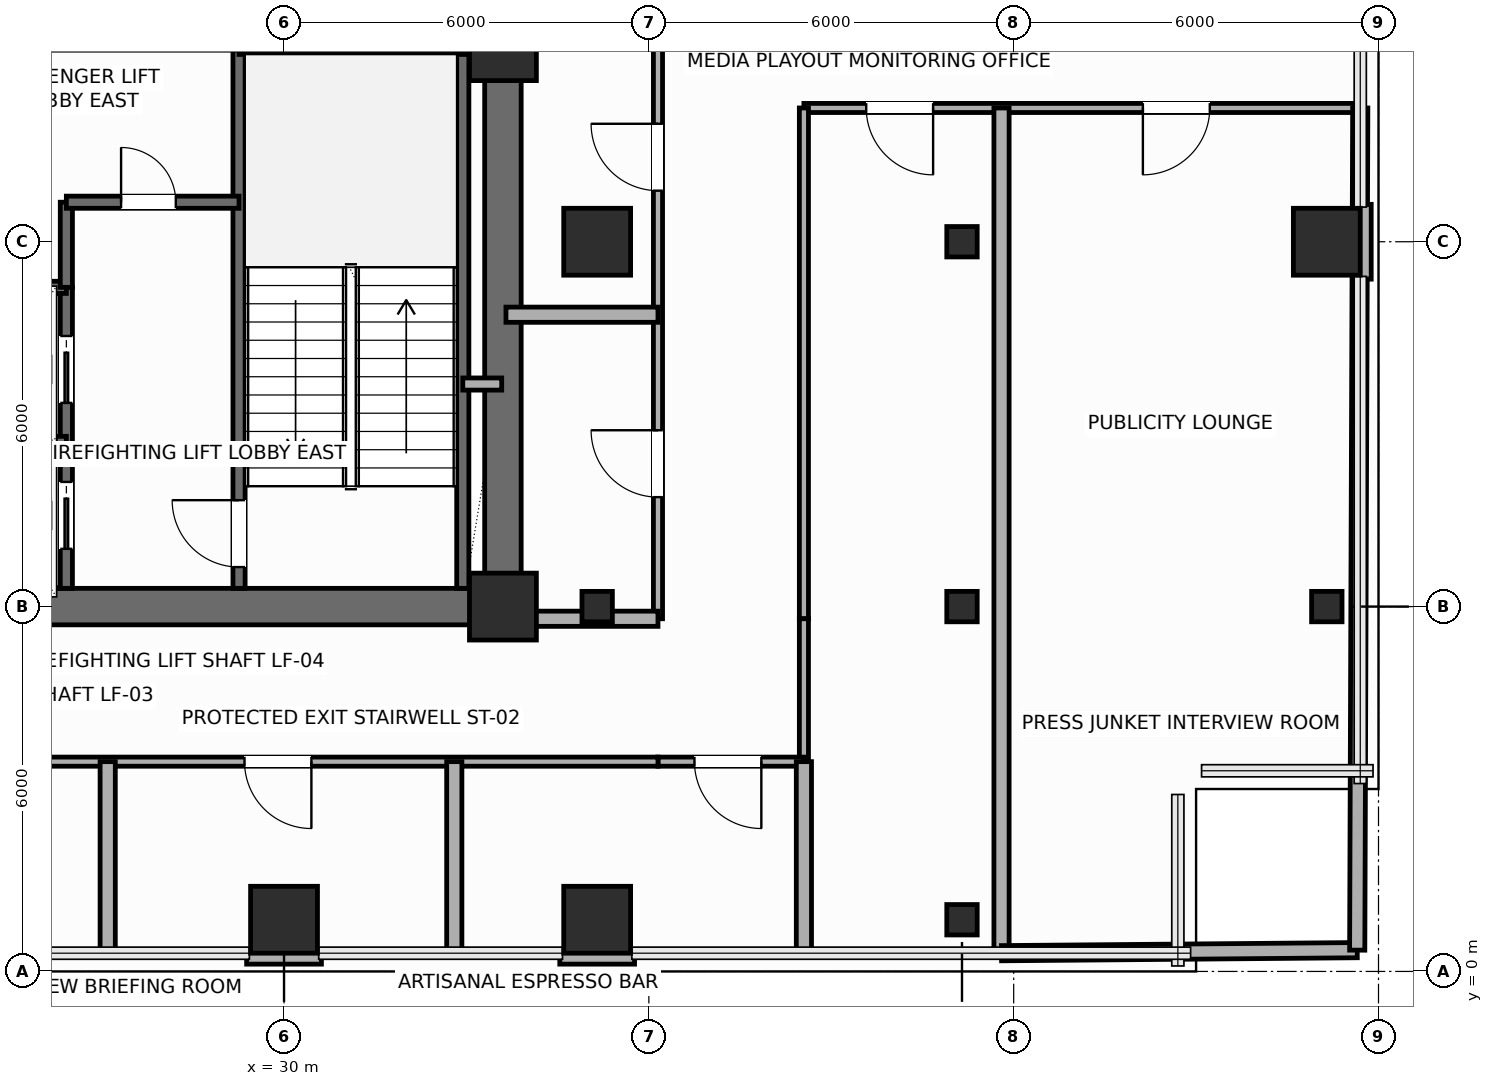
"""IFC4 building model, lengths in metres.
Left out: names, types, materials, properties, quantities, classifications, styles, units other than length and angle.
Written with IfcOpenShell. Run it as: python <this file> out.ifc"""

import sys

from ifc_helpers import new_model, si_unit, direction, frame, frame_2d, origin, origin_2d, place, context, subcontext, project, spatial, rectangle, hollow_rectangle, extrude, element, fill, save


model = new_model("IFC4")
c1 = context("Model", 3, precision=1e-05, world=origin(), true_north=direction((0.0, 1.0)))
c2 = subcontext(c1, "Body", "Model", "MODEL_VIEW")
j1 = project(units=[si_unit("LENGTHUNIT", "METRE"), si_unit("PLANEANGLEUNIT", "RADIAN")], contexts=[c1])
p1 = place(None, origin())
s1 = spatial("IfcSite", under=j1, at=p1, CompositionType="ELEMENT")
p2 = place(p1, origin())
s2 = spatial("IfcBuilding", under=s1, at=p2, CompositionType="ELEMENT")
p3 = place(p2, frame((0.0, 0.0, 126.9)))
s3 = spatial("IfcBuildingStorey", under=s2, at=p3, CompositionType="ELEMENT", Elevation=126.9)
for number, where, z_axis, x_axis in (
    (1, (33.6, 6.0, 0.0), (0.0, 0.0, 1.0), (1.0, 0.0, 0.0)),
    (2, (33.6, 15.2, 0.0), (0.0, 0.0, 1.0), (1.0, 0.0, 0.0)),
    (3, (30.0, 0.85, 0.0), (0.0, 0.0, 1.0), (1.0, 0.0, 0.0)),
    (4, (35.15, 0.85, 0.0), (0.0, 0.0, 1.0), (1.0, 0.0, 0.0)),
):
    element("IfcColumn", number, at=place(p3, frame(where, z_axis=z_axis, x_axis=x_axis)), inside=s3, PredefinedType="COLUMN", context=c2, shape_type="SweptSolid", body=[
        extrude(rectangle(XDim=1.1, YDim=1.1, at=origin_2d()), origin(), (0.0, 0.0, 1.0), 3.75),
    ])
p4 = place(p3, frame((35.15, 6.0, 0.0), z_axis=(0.0, 0.0, 1.0), x_axis=(1.0, 0.0, 0.0)))
e5 = element("IfcColumn", 5, at=p4, inside=s3, PredefinedType="COLUMN", context=c2, shape_type="SweptSolid", body=[
    extrude(hollow_rectangle(XDim=0.5, YDim=0.5, WallThickness=0.025, InnerFilletRadius=0.025, OuterFilletRadius=0.04, at=origin_2d()), origin(), (0.0, 0.0, 1.0), 3.75),
])
p5 = place(p3, frame((35.15, 12.0, 0.0), z_axis=(0.0, 0.0, 1.0), x_axis=(1.0, 0.0, 0.0)))
e6 = element("IfcColumn", 6, at=p5, inside=s3, PredefinedType="COLUMN", context=c2, shape_type="SweptSolid", body=[
    extrude(rectangle(XDim=1.1, YDim=1.1, at=origin_2d()), origin(), (0.0, 0.0, 1.0), 3.75),
])
for number, where, z_axis, x_axis in (
    (7, (41.15, 0.85, 0.0), (0.0, 0.0, 1.0), (1.0, 0.0, 0.0)),
    (8, (41.15, 6.0, 0.0), (0.0, 0.0, 1.0), (1.0, 0.0, 0.0)),
    (9, (41.15, 12.0, 0.0), (0.0, 0.0, 1.0), (1.0, 0.0, 0.0)),
    (10, (47.15, 6.0, 0.0), (0.0, 0.0, 1.0), (1.0, 0.0, 0.0)),
):
    element("IfcColumn", number, at=place(p3, frame(where, z_axis=z_axis, x_axis=x_axis)), inside=s3, PredefinedType="COLUMN", context=c2, shape_type="SweptSolid", body=[
        extrude(hollow_rectangle(XDim=0.5, YDim=0.5, WallThickness=0.025, InnerFilletRadius=0.025, OuterFilletRadius=0.04, at=origin_2d()), origin(), (0.0, 0.0, 1.0), 3.75),
    ])
p6 = place(p3, frame((47.15, 12.0, 0.0), z_axis=(0.0, 0.0, 1.0), x_axis=(1.0, 0.0, 0.0)))
e11 = element("IfcColumn", 11, at=p6, inside=s3, PredefinedType="COLUMN", context=c2, shape_type="SweptSolid", body=[
    extrude(rectangle(XDim=1.1, YDim=1.1, at=origin_2d()), origin(), (0.0, 0.0, 1.0), 3.75),
])
for number, where, z_axis, x_axis in (
    (12, (47.76, 12.615, 0.0), (0.0, 0.0, 1.0), (0.0, -1.0, 0.0)),
    (13, (35.765, 0.24, 0.0), (0.0, 0.0, 1.0), (-1.0, 0.0, 0.0)),
    (14, (30.615, 0.24, 0.0), (0.0, 0.0, 1.0), (-1.0, 0.0, 0.0)),
):
    element("IfcWall", number, at=place(p3, frame(where, z_axis=z_axis, x_axis=x_axis)), inside=s3, PredefinedType="SOLIDWALL", context=c2, shape_type="SweptSolid", body=[
        extrude(rectangle(XDim=1.23, YDim=0.24, at=frame_2d((0.615, 0.0))), origin(), (0.0, 0.0, 1.0), 3.525),
    ])
p7 = place(p3, frame((24.0, 6.0, 0.0), z_axis=(0.0, 0.0, 1.0), x_axis=(1.0, 0.0, 0.0)))
e15 = element("IfcWall", 15, at=p7, inside=s3, PredefinedType="SHEAR", context=c2, shape_type="SweptSolid", body=[
    extrude(rectangle(XDim=9.6, YDim=0.6, at=frame_2d((4.8, 0.0))), origin(), (0.0, 0.0, 1.0), 3.525),
])
p8 = place(p3, frame((33.6, 6.0, 0.0), z_axis=(0.0, 0.0, 1.0), x_axis=(0.0, 1.0, 0.0)))
e16 = element("IfcWall", 16, at=p8, inside=s3, PredefinedType="SHEAR", context=c2, shape_type="SweptSolid", body=[
    extrude(rectangle(XDim=12.0, YDim=0.6, at=frame_2d((6.0, 0.0))), origin(), (0.0, 0.0, 1.0), 3.525),
])
p9 = place(p8, frame((10.2, 0.0, 0.0)))
e17 = element("IfcOpeningElement", 17, at=p9, cuts=e16, PredefinedType="OPENING", context=c2, shape_type="SweptSolid", body=[
    extrude(rectangle(XDim=0.9, YDim=2.15, at=frame_2d((0.45, 1.075))), frame((0.0, 0.31, 0.0), z_axis=(0.0, -1.0, 0.0), x_axis=(1.0, 0.0, 0.0)), (0.0, 0.0, 1.0), 0.62),
])
p10 = place(p3, frame((29.26, 6.3, 0.0), z_axis=(0.0, 0.0, 1.0), x_axis=(0.0, 1.0, 0.0)))
e18 = element("IfcWall", 18, at=p10, inside=s3, PredefinedType="SHEAR", context=c2, shape_type="SweptSolid", body=[
    extrude(rectangle(XDim=8.88, YDim=0.2, at=frame_2d((4.44, 0.0))), origin(), (0.0, 0.0, 1.0), 3.525),
])
p11 = place(p10, frame((0.35, 0.0, 0.0)))
e19 = element("IfcOpeningElement", 19, at=p11, cuts=e18, PredefinedType="OPENING", context=c2, shape_type="SweptSolid", body=[
    extrude(rectangle(XDim=1.1, YDim=2.2, at=frame_2d((0.55, 1.1))), frame((0.0, 0.11, 0.0), z_axis=(0.0, -1.0, 0.0), x_axis=(1.0, 0.0, 0.0)), (0.0, 0.0, 1.0), 0.22),
])
p12 = place(p3, frame((32.94, 6.3, 0.0), z_axis=(0.0, 0.0, 1.0), x_axis=(0.0, 1.0, 0.0)))
e20 = element("IfcWall", 20, at=p12, inside=s3, PredefinedType="SHEAR", context=c2, shape_type="SweptSolid", body=[
    extrude(rectangle(XDim=8.88, YDim=0.2, at=frame_2d((4.44, 0.0))), origin(), (0.0, 0.0, 1.0), 3.525),
])
p13 = place(p3, frame((29.26, 15.18, 0.0), z_axis=(0.0, 0.0, 1.0), x_axis=(1.0, 0.0, 0.0)))
e21 = element("IfcWall", 21, at=p13, inside=s3, PredefinedType="SHEAR", context=c2, shape_type="SweptSolid", body=[
    extrude(rectangle(XDim=4.04, YDim=0.2, at=frame_2d((2.02, 0.0))), origin(), (0.0, 0.0, 1.0), 3.525),
])
p14 = place(p3, frame((26.42, 6.3, 0.0), z_axis=(0.0, 0.0, 1.0), x_axis=(0.0, 1.0, 0.0)))
e22 = element("IfcWall", 22, at=p14, inside=s3, PredefinedType="SHEAR", context=c2, shape_type="SweptSolid", body=[
    extrude(rectangle(XDim=4.95, YDim=0.2, at=frame_2d((2.475, 0.0))), origin(), (0.0, 0.0, 1.0), 3.525),
])
p15 = place(p14, frame((0.65, 0.0, 0.0)))
e23 = element("IfcOpeningElement", 23, at=p15, cuts=e22, PredefinedType="OPENING", context=c2, shape_type="SweptSolid", body=[
    extrude(rectangle(XDim=1.1, YDim=2.2, at=frame_2d((0.55, 1.1))), frame((0.0, 0.11, 0.0), z_axis=(0.0, -1.0, 0.0), x_axis=(1.0, 0.0, 0.0)), (0.0, 0.0, 1.0), 0.22),
])
p16 = place(p14, frame((3.05, 0.0, 0.0)))
e24 = element("IfcOpeningElement", 24, at=p16, cuts=e22, PredefinedType="OPENING", context=c2, shape_type="SweptSolid", body=[
    extrude(rectangle(XDim=1.1, YDim=2.2, at=frame_2d((0.55, 1.1))), frame((0.0, 0.11, 0.0), z_axis=(0.0, -1.0, 0.0), x_axis=(1.0, 0.0, 0.0)), (0.0, 0.0, 1.0), 0.22),
])
for number, where, z_axis, x_axis in (
    (25, (24.25, 8.7, 0.0), (0.0, 0.0, 1.0), (1.0, 0.0, 0.0)),
    (26, (24.25, 11.25, 0.0), (0.0, 0.0, 1.0), (1.0, 0.0, 0.0)),
):
    element("IfcWall", number, at=place(p3, frame(where, z_axis=z_axis, x_axis=x_axis)), inside=s3, PredefinedType="SHEAR", context=c2, shape_type="SweptSolid", body=[
        extrude(rectangle(XDim=2.17, YDim=0.2, at=frame_2d((1.085, 0.0))), origin(), (0.0, 0.0, 1.0), 3.525),
    ])
p17 = place(p3, frame((26.42, 11.25, 0.0), z_axis=(0.0, 0.0, 1.0), x_axis=(0.0, 1.0, 0.0)))
e27 = element("IfcWall", 27, at=p17, inside=s3, PredefinedType="SHEAR", context=c2, shape_type="SweptSolid", body=[
    extrude(rectangle(XDim=1.4, YDim=0.2, at=frame_2d((0.7, 0.0))), origin(), (0.0, 0.0, 1.0), 3.525),
])
p18 = place(p3, frame((26.42, 12.65, 0.0), z_axis=(0.0, 0.0, 1.0), x_axis=(1.0, 0.0, 0.0)))
e28 = element("IfcWall", 28, at=p18, inside=s3, PredefinedType="SHEAR", context=c2, shape_type="SweptSolid", body=[
    extrude(rectangle(XDim=2.84, YDim=0.2, at=frame_2d((1.42, 0.0))), origin(), (0.0, 0.0, 1.0), 3.525),
])
p19 = place(p18, frame((0.9, 0.0, 0.0)))
e29 = element("IfcOpeningElement", 29, at=p19, cuts=e28, PredefinedType="OPENING", context=c2, shape_type="SweptSolid", body=[
    extrude(rectangle(XDim=0.9, YDim=2.15, at=frame_2d((0.45, 1.075))), frame((0.0, 0.11, 0.0), z_axis=(0.0, -1.0, 0.0), x_axis=(1.0, 0.0, 0.0)), (0.0, 0.0, 1.0), 0.22),
])
p20 = place(p3, frame((32.94, 9.66, 0.0), z_axis=(0.0, 0.0, 1.0), x_axis=(1.0, 0.0, 0.0)))
e30 = element("IfcWall", 30, at=p20, inside=s3, PredefinedType="SOLIDWALL", context=c2, shape_type="SweptSolid", body=[
    extrude(rectangle(XDim=0.64, YDim=0.2, at=frame_2d((0.32, 0.0))), origin(), (0.0, 0.0, 1.0), 3.525),
])
p21 = place(p3, frame((36.15, 5.8, 0.0), z_axis=(0.0, 0.0, 1.0), x_axis=(0.0, 1.0, 0.0)))
e31 = element("IfcWall", 31, at=p21, inside=s3, PredefinedType="PARTITIONING", context=c2, shape_type="SweptSolid", body=[
    extrude(rectangle(XDim=10.08, YDim=0.15, at=frame_2d((5.04, 0.0))), origin(), (0.0, 0.0, 1.0), 3.525),
])
p22 = place(p21, frame((2.0, 0.0, 0.0)))
e32 = element("IfcOpeningElement", 32, at=p22, cuts=e31, PredefinedType="OPENING", context=c2, shape_type="SweptSolid", body=[
    extrude(rectangle(XDim=1.1, YDim=2.25, at=frame_2d((0.55, 1.125))), frame((0.0, 0.085, 0.0), z_axis=(0.0, -1.0, 0.0), x_axis=(1.0, 0.0, 0.0)), (0.0, 0.0, 1.0), 0.17),
])
p23 = place(p21, frame((7.04, 0.0, 0.0)))
e33 = element("IfcOpeningElement", 33, at=p23, cuts=e31, PredefinedType="OPENING", context=c2, shape_type="SweptSolid", body=[
    extrude(rectangle(XDim=1.1, YDim=2.25, at=frame_2d((0.55, 1.125))), frame((0.0, 0.085, 0.0), z_axis=(0.0, -1.0, 0.0), x_axis=(1.0, 0.0, 0.0)), (0.0, 0.0, 1.0), 0.17),
])
p24 = place(p3, frame((47.7, 14.2, 0.0), z_axis=(0.0, 0.0, 1.0), x_axis=(-1.0, 0.0, 0.0)))
e34 = element("IfcWall", 34, at=p24, inside=s3, PredefinedType="PARTITIONING", context=c2, shape_type="SweptSolid", body=[
    extrude(rectangle(XDim=9.15, YDim=0.15, at=frame_2d((4.575, 0.0))), origin(), (0.0, 0.0, 1.0), 3.525),
])
p25 = place(p24, frame((7.025, 0.0, 0.0)))
e35 = element("IfcOpeningElement", 35, at=p25, cuts=e34, PredefinedType="OPENING", context=c2, shape_type="SweptSolid", body=[
    extrude(rectangle(XDim=1.1, YDim=2.25, at=frame_2d((0.55, 1.125))), frame((0.0, 0.085, 0.0), z_axis=(0.0, -1.0, 0.0), x_axis=(1.0, 0.0, 0.0)), (0.0, 0.0, 1.0), 0.17),
])
p26 = place(p24, frame((2.475, 0.0, 0.0)))
e36 = element("IfcOpeningElement", 36, at=p26, cuts=e34, PredefinedType="OPENING", context=c2, shape_type="SweptSolid", body=[
    extrude(rectangle(XDim=1.1, YDim=2.25, at=frame_2d((0.55, 1.125))), frame((0.0, 0.085, 0.0), z_axis=(0.0, -1.0, 0.0), x_axis=(1.0, 0.0, 0.0)), (0.0, 0.0, 1.0), 0.17),
])
p27 = place(p3, frame((38.55, 14.2, 0.0), z_axis=(0.0, 0.0, 1.0), x_axis=(0.0, -1.0, 0.0)))
e37 = element("IfcWall", 37, at=p27, inside=s3, PredefinedType="PARTITIONING", context=c2, shape_type="SweptSolid", body=[
    extrude(rectangle(XDim=8.4, YDim=0.15, at=frame_2d((4.2, 0.0))), origin(), (0.0, 0.0, 1.0), 3.525),
])
p28 = place(p3, frame((38.55, 5.8, 0.0), z_axis=(0.0, 0.0, 1.0), x_axis=(0.0, -1.0, 0.0)))
e38 = element("IfcWall", 38, at=p28, inside=s3, PredefinedType="PARTITIONING", context=c2, shape_type="SweptSolid", body=[
    extrude(rectangle(XDim=2.35, YDim=0.15, at=frame_2d((1.175, 0.0))), origin(), (0.0, 0.0, 1.0), 3.525),
])
p29 = place(p3, frame((38.55, 3.45, 0.0), z_axis=(0.0, 0.0, 1.0), x_axis=(-1.0, 0.0, 0.0)))
e39 = element("IfcWall", 39, at=p29, inside=s3, PredefinedType="PARTITIONING", context=c2, shape_type="SweptSolid", body=[
    extrude(rectangle(XDim=2.4, YDim=0.15, at=frame_2d((1.2, 0.0))), origin(), (0.0, 0.0, 1.0), 3.067),
])
p30 = place(p29, frame((0.7, 0.0, 0.0)))
e40 = element("IfcOpeningElement", 40, at=p30, cuts=e39, PredefinedType="OPENING", context=c2, shape_type="SweptSolid", body=[
    extrude(rectangle(XDim=1.1, YDim=2.25, at=frame_2d((0.55, 1.125))), frame((0.0, 0.085, 0.0), z_axis=(0.0, -1.0, 0.0), x_axis=(1.0, 0.0, 0.0)), (0.0, 0.0, 1.0), 0.17),
])
p31 = place(p3, frame((36.15, 3.45, 0.0), z_axis=(0.0, 0.0, 1.0), x_axis=(-1.0, 0.0, 0.0)))
e41 = element("IfcWall", 41, at=p31, inside=s3, PredefinedType="PARTITIONING", context=c2, shape_type="SweptSolid", body=[
    extrude(rectangle(XDim=12.2, YDim=0.15, at=frame_2d((6.1, 0.0))), origin(), (0.0, 0.0, 1.0), 3.067),
])
p32 = place(p31, frame((10.125, 0.0, 0.0)))
e42 = element("IfcOpeningElement", 42, at=p32, cuts=e41, PredefinedType="OPENING", context=c2, shape_type="SweptSolid", body=[
    extrude(rectangle(XDim=1.1, YDim=2.25, at=frame_2d((0.55, 1.125))), frame((0.0, 0.085, 0.0), z_axis=(0.0, -1.0, 0.0), x_axis=(1.0, 0.0, 0.0)), (0.0, 0.0, 1.0), 0.17),
])
p33 = place(p31, frame((5.7, 0.0, 0.0)))
e43 = element("IfcOpeningElement", 43, at=p33, cuts=e41, PredefinedType="OPENING", context=c2, shape_type="SweptSolid", body=[
    extrude(rectangle(XDim=1.1, YDim=2.25, at=frame_2d((0.55, 1.125))), frame((0.0, 0.085, 0.0), z_axis=(0.0, -1.0, 0.0), x_axis=(1.0, 0.0, 0.0)), (0.0, 0.0, 1.0), 0.17),
])
for number, where, z_axis, x_axis in (
    (44, (27.1, 0.3, 0.0), (0.0, 0.0, 1.0), (0.0, 1.0, 0.0)),
    (45, (32.8, 0.3, 0.0), (0.0, 0.0, 1.0), (0.0, 1.0, 0.0)),
    (46, (38.55, 0.3, 0.0), (0.0, 0.0, 1.0), (0.0, 1.0, 0.0)),
):
    element("IfcWall", number, at=place(p3, frame(where, z_axis=z_axis, x_axis=x_axis)), inside=s3, PredefinedType="PARTITIONING", context=c2, shape_type="SweptSolid", body=[
        extrude(rectangle(XDim=3.15, YDim=0.25, at=frame_2d((1.575, 0.0))), origin(), (0.0, 0.0, 1.0), 3.525),
    ])
p34 = place(p3, frame((33.65, 5.8, 0.0), z_axis=(0.0, 0.0, 1.0), x_axis=(1.0, 0.0, 0.0)))
e47 = element("IfcWall", 47, at=p34, inside=s3, PredefinedType="PARTITIONING", context=c2, shape_type="SweptSolid", body=[
    extrude(rectangle(XDim=2.5, YDim=0.25, at=frame_2d((1.25, 0.0))), origin(), (0.0, 0.0, 1.0), 3.017),
])
p35 = place(p3, frame((33.65, 10.8, 0.0), z_axis=(0.0, 0.0, 1.0), x_axis=(1.0, 0.0, 0.0)))
e48 = element("IfcWall", 48, at=p35, inside=s3, PredefinedType="PARTITIONING", context=c2, shape_type="SweptSolid", body=[
    extrude(rectangle(XDim=2.5, YDim=0.25, at=frame_2d((1.25, 0.0))), origin(), (0.0, 0.0, 1.0), 3.525),
])
p36 = place(p3, frame((41.8, 0.3, 0.0), z_axis=(0.0, 0.0, 1.0), x_axis=(0.0, 1.0, 0.0)))
e49 = element("IfcWall", 49, at=p36, inside=s3, PredefinedType="PARTITIONING", context=c2, shape_type="SweptSolid", body=[
    extrude(rectangle(XDim=13.9, YDim=0.25, at=frame_2d((6.95, 0.0))), origin(), (0.0, 0.0, 1.0), 3.525),
])
p37 = place(p3, frame((41.8, 0.3, 0.0), z_axis=(0.0, 0.0, 1.0), x_axis=(0.999963403125, 0.00855525636, 0.0)))
e50 = element("IfcWall", 50, at=p37, inside=s3, PredefinedType="PARTITIONING", context=c2, shape_type="SweptSolid", body=[
    extrude(rectangle(XDim=5.85, YDim=0.25, at=frame_2d((2.925, 0.0))), origin(), (0.0, 0.0, 1.0), 3.525),
])
p38 = place(p3, frame((47.65, 0.35, 0.0), z_axis=(0.0, 0.0, 1.0), x_axis=(0.003606251025, 0.999993497456, 0.0)))
e51 = element("IfcWall", 51, at=p38, inside=s3, PredefinedType="PARTITIONING", context=c2, shape_type="SweptSolid", body=[
    extrude(rectangle(XDim=11.035, YDim=0.25, at=frame_2d((5.518, 0.0))), origin(), (0.0, 0.0, 1.0), 3.525),
])
p39 = place(p3, frame((47.694, 12.615, 0.0), z_axis=(0.0, 0.0, 1.0), x_axis=(0.003542799701, 0.999993724265, 0.0)))
e52 = element("IfcWall", 52, at=p39, inside=s3, PredefinedType="PARTITIONING", context=c2, shape_type="SweptSolid", body=[
    extrude(rectangle(XDim=1.585, YDim=0.25, at=frame_2d((0.792, 0.0))), origin(), (0.0, 0.0, 1.0), 3.525),
])
p40 = place(p11, origin())
e53 = element("IfcDoor", 53, at=p40, inside=s3, OperationType="SINGLE_SWING_RIGHT", PredefinedType="DOOR", context=c2, shape_type="SweptSolid", body=[
    extrude(rectangle(XDim=1.1, YDim=2.2, at=frame_2d((0.55, 1.1))), frame((0.0, 0.025, 0.0), z_axis=(0.0, -1.0, 0.0), x_axis=(1.0, 0.0, 0.0)), (0.0, 0.0, 1.0), 0.05),
])
fill(e19, e53)
p41 = place(p15, origin())
e54 = element("IfcDoor", 54, at=p41, inside=s3, OperationType="SLIDING_TO_LEFT", PredefinedType="DOOR", context=c2, shape_type="SweptSolid", body=[
    extrude(rectangle(XDim=1.1, YDim=2.2, at=frame_2d((0.55, 1.1))), frame((0.0, 0.025, 0.0), z_axis=(0.0, -1.0, 0.0), x_axis=(1.0, 0.0, 0.0)), (0.0, 0.0, 1.0), 0.05),
])
fill(e23, e54)
p42 = place(p16, origin())
e55 = element("IfcDoor", 55, at=p42, inside=s3, OperationType="SLIDING_TO_LEFT", PredefinedType="DOOR", context=c2, shape_type="SweptSolid", body=[
    extrude(rectangle(XDim=1.1, YDim=2.2, at=frame_2d((0.55, 1.1))), frame((0.0, 0.025, 0.0), z_axis=(0.0, -1.0, 0.0), x_axis=(1.0, 0.0, 0.0)), (0.0, 0.0, 1.0), 0.05),
])
fill(e24, e55)
p43 = place(p19, origin())
e56 = element("IfcDoor", 56, at=p43, inside=s3, OperationType="SINGLE_SWING_LEFT", PredefinedType="DOOR", context=c2, shape_type="SweptSolid", body=[
    extrude(rectangle(XDim=0.9, YDim=2.15, at=frame_2d((0.45, 1.075))), frame((0.0, 0.025, 0.0), z_axis=(0.0, -1.0, 0.0), x_axis=(1.0, 0.0, 0.0)), (0.0, 0.0, 1.0), 0.05),
])
fill(e29, e56)
p44 = place(p22, origin())
e57 = element("IfcDoor", 57, at=p44, inside=s3, OperationType="SINGLE_SWING_RIGHT", PredefinedType="DOOR", context=c2, shape_type="SweptSolid", body=[
    extrude(rectangle(XDim=1.1, YDim=2.25, at=frame_2d((0.55, 1.125))), frame((0.0, 0.025, 0.0), z_axis=(0.0, -1.0, 0.0), x_axis=(1.0, 0.0, 0.0)), (0.0, 0.0, 1.0), 0.05),
])
fill(e32, e57)
p45 = place(p23, origin())
e58 = element("IfcDoor", 58, at=p45, inside=s3, OperationType="SINGLE_SWING_RIGHT", PredefinedType="DOOR", context=c2, shape_type="SweptSolid", body=[
    extrude(rectangle(XDim=1.1, YDim=2.25, at=frame_2d((0.55, 1.125))), frame((0.0, 0.025, 0.0), z_axis=(0.0, -1.0, 0.0), x_axis=(1.0, 0.0, 0.0)), (0.0, 0.0, 1.0), 0.05),
])
fill(e33, e58)
p46 = place(p25, origin())
e59 = element("IfcDoor", 59, at=p46, inside=s3, OperationType="SINGLE_SWING_LEFT", PredefinedType="DOOR", context=c2, shape_type="SweptSolid", body=[
    extrude(rectangle(XDim=1.1, YDim=2.25, at=frame_2d((0.55, 1.125))), frame((0.0, 0.025, 0.0), z_axis=(0.0, -1.0, 0.0), x_axis=(1.0, 0.0, 0.0)), (0.0, 0.0, 1.0), 0.05),
])
fill(e35, e59)
p47 = place(p26, origin())
e60 = element("IfcDoor", 60, at=p47, inside=s3, OperationType="SINGLE_SWING_RIGHT", PredefinedType="DOOR", context=c2, shape_type="SweptSolid", body=[
    extrude(rectangle(XDim=1.1, YDim=2.25, at=frame_2d((0.55, 1.125))), frame((0.0, 0.025, 0.0), z_axis=(0.0, -1.0, 0.0), x_axis=(1.0, 0.0, 0.0)), (0.0, 0.0, 1.0), 0.05),
])
fill(e36, e60)
p48 = place(p30, origin())
e61 = element("IfcDoor", 61, at=p48, inside=s3, OperationType="SINGLE_SWING_LEFT", PredefinedType="DOOR", context=c2, shape_type="SweptSolid", body=[
    extrude(rectangle(XDim=1.1, YDim=2.25, at=frame_2d((0.55, 1.125))), frame((0.0, 0.025, 0.0), z_axis=(0.0, -1.0, 0.0), x_axis=(1.0, 0.0, 0.0)), (0.0, 0.0, 1.0), 0.05),
])
fill(e40, e61)
p49 = place(p33, origin())
e62 = element("IfcDoor", 62, at=p49, inside=s3, OperationType="SINGLE_SWING_LEFT", PredefinedType="DOOR", context=c2, shape_type="SweptSolid", body=[
    extrude(rectangle(XDim=1.1, YDim=2.25, at=frame_2d((0.55, 1.125))), frame((0.0, 0.025, 0.0), z_axis=(0.0, -1.0, 0.0), x_axis=(1.0, 0.0, 0.0)), (0.0, 0.0, 1.0), 0.05),
])
fill(e43, e62)
save(model, sys.argv[1])
